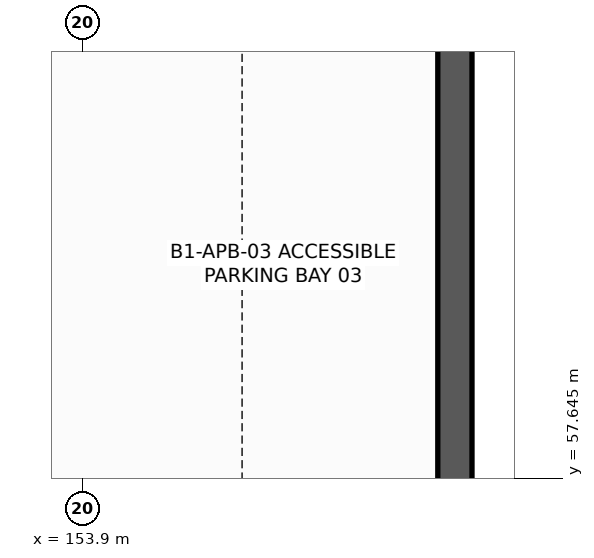
"""IFC4 building model, lengths in metres.
Left out: names, types, materials, properties, quantities, classifications, styles, units other than length and angle.
Written with IfcOpenShell. Run it as: python <this file> out.ifc"""

import sys

from ifc_helpers import new_model, si_unit, direction, frame, frame_2d, origin, place, context, subcontext, project, spatial, rectangle, extrude, element, save


model = new_model("IFC4")
c1 = context("Model", 3, precision=1e-05, world=origin(), true_north=direction((0.0, 1.0)))
c2 = subcontext(c1, "Body", "Model", "MODEL_VIEW")
j1 = project(units=[si_unit("LENGTHUNIT", "METRE"), si_unit("PLANEANGLEUNIT", "RADIAN")], contexts=[c1])
p1 = place(None, origin())
s1 = spatial("IfcSite", under=j1, at=p1, CompositionType="ELEMENT")
p2 = place(p1, origin())
s2 = spatial("IfcBuilding", under=s1, at=p2, CompositionType="ELEMENT")
p3 = place(p2, frame((0.0, 0.0, -5.4)))
s3 = spatial("IfcBuildingStorey", under=s2, at=p3, CompositionType="ELEMENT", Elevation=-5.4)
p4 = place(p3, frame((158.8, 56.7, 0.0), z_axis=(0.0, 0.0, 1.0), x_axis=(0.0, 1.0, 0.0)))
e1 = element("IfcWall", 1, at=p4, inside=s3, PredefinedType="USERDEFINED", context=c2, shape_type="SweptSolid", body=[
    extrude(rectangle(XDim=8.1, YDim=0.45, at=frame_2d((4.05, 0.0))), origin(), (0.0, 0.0, 1.0), 5.1),
])
save(model, sys.argv[1])
